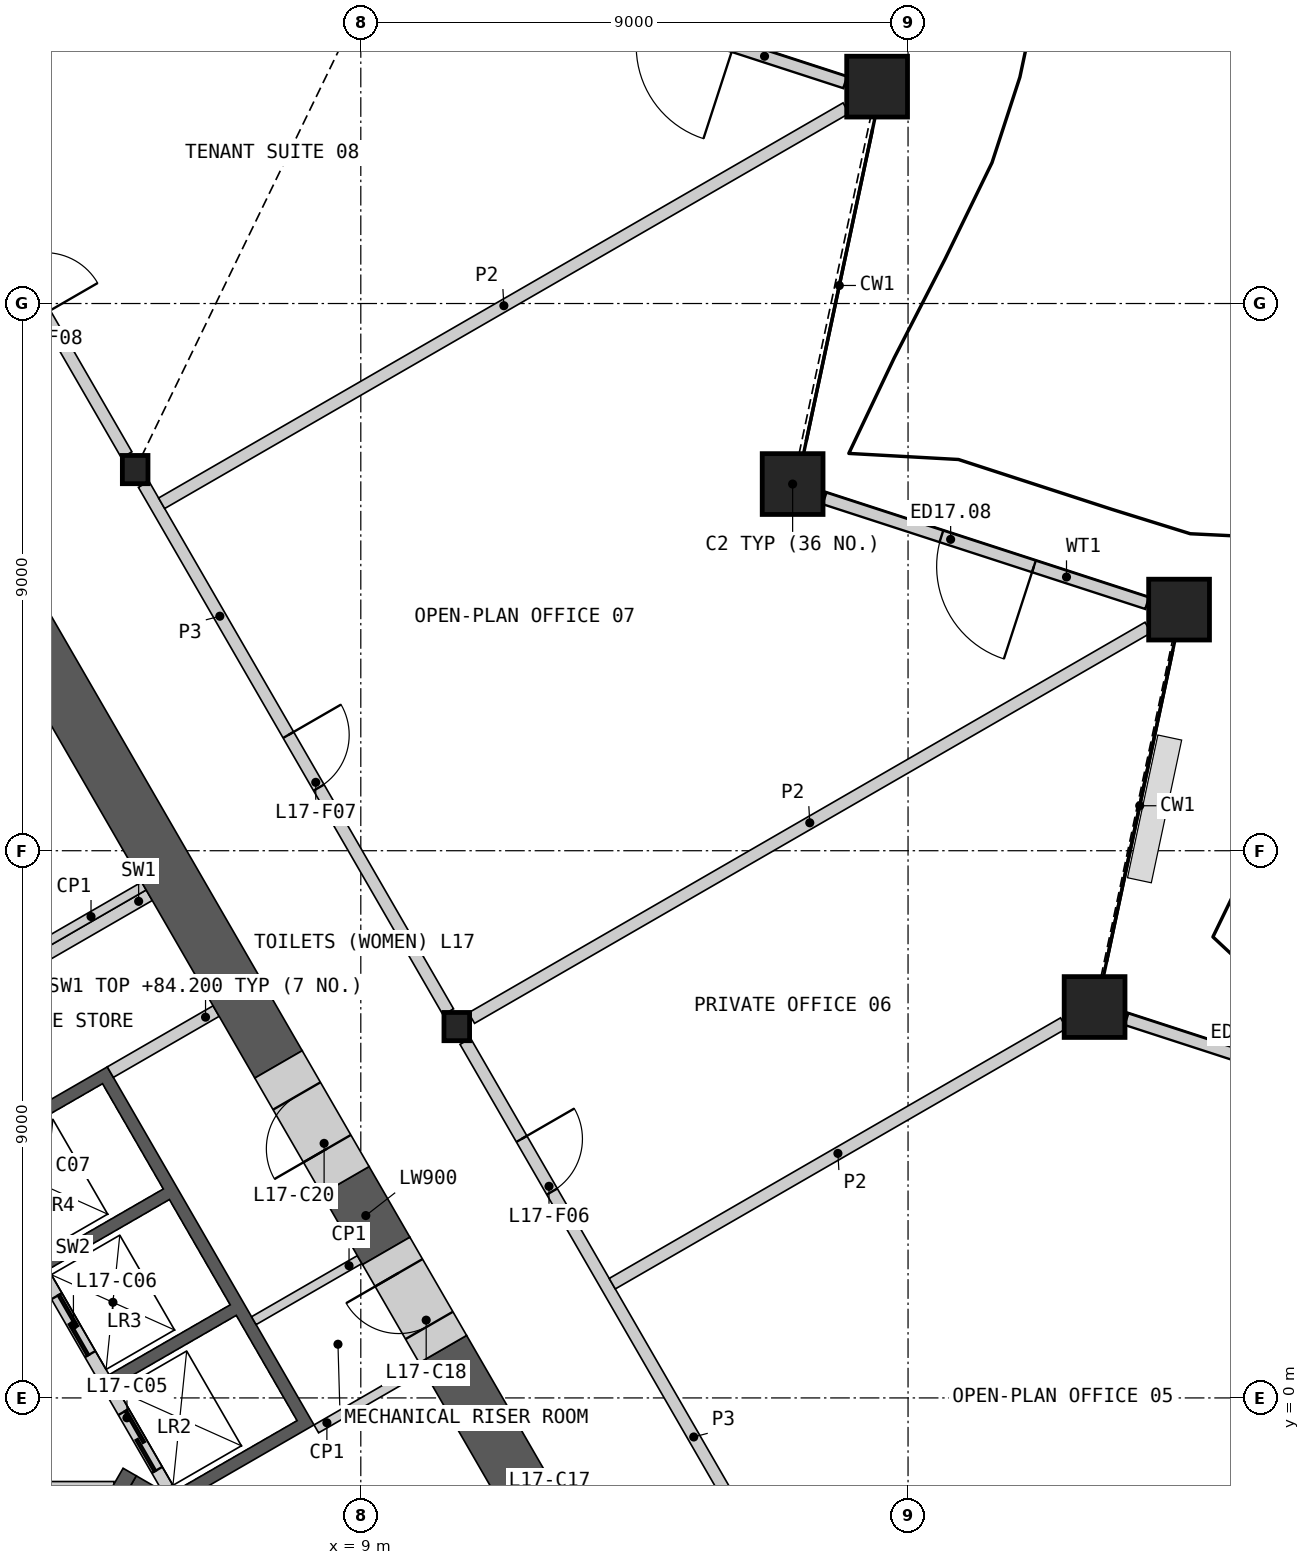
"""IFC4 building model, lengths in metres.
Left out: names, types, materials, properties, quantities, classifications, styles, units other than length and angle.
Written with IfcOpenShell. Run it as: python <this file> out.ifc"""

import sys

from ifc_helpers import new_model, si_unit, direction, frame, frame_2d, origin, origin_2d, place, context, subcontext, project, spatial, polyline, rectangle, hollow_rectangle, i_section, outline, extrude, element, fill, save


model = new_model("IFC4")
c1 = context("Model", 3, precision=1e-05, world=origin(), true_north=direction((0.0, 1.0)))
c2 = subcontext(c1, "Body", "Model", "MODEL_VIEW")
j1 = project(units=[si_unit("LENGTHUNIT", "METRE"), si_unit("PLANEANGLEUNIT", "RADIAN")], contexts=[c1])
p1 = place(None, origin())
s1 = spatial("IfcSite", under=j1, at=p1, CompositionType="ELEMENT")
p2 = place(p1, origin())
s2 = spatial("IfcBuilding", under=s1, at=p2, CompositionType="ELEMENT")
p3 = place(p2, frame((0.0, 0.0, 80.4)))
s3 = spatial("IfcBuildingStorey", under=s2, at=p3, CompositionType="ELEMENT", Elevation=80.4)
for number, where, z_axis, x_axis in (
    (1, (21.068, 6.429, 0.0), (0.0, 0.0, 1.0), (1.0, 0.0, 0.0)),
    (2, (22.457, 12.966, 0.0), (0.0, 0.0, 1.0), (1.0, 0.0, 0.0)),
    (3, (16.102, 15.031, 0.0), (0.0, 0.0, 1.0), (1.0, 0.0, 0.0)),
    (4, (17.491, 21.567, 0.0), (0.0, 0.0, 1.0), (1.0, 0.0, 0.0)),
):
    element("IfcColumn", number, at=place(p3, frame(where, z_axis=z_axis, x_axis=x_axis)), inside=s3, PredefinedType="COLUMN", context=c2, shape_type="SweptSolid", body=[
        extrude(hollow_rectangle(XDim=1.0, YDim=1.0, WallThickness=0.07, at=origin_2d()), origin(), (0.0, 0.0, 1.0), 4.2),
    ])
for number, where, z_axis, x_axis in (
    (5, (10.578, 6.107, 0.0), (0.0, 0.0, 1.0), (1.0, 0.0, 0.0)),
    (6, (5.289, 15.269, 0.0), (0.0, 0.0, 1.0), (1.0, 0.0, 0.0)),
):
    element("IfcColumn", number, at=place(p3, frame(where, z_axis=z_axis, x_axis=x_axis)), inside=s3, PredefinedType="COLUMN", context=c2, shape_type="SweptSolid", body=[
        extrude(i_section(OverallWidth=0.421, OverallDepth=0.465, WebThickness=0.045, FlangeThickness=0.072, at=origin_2d()), origin(), (0.0, 0.0, 1.0), 4.2),
    ])
p4 = place(p3, frame((26.899, 4.505, 0.0), z_axis=(0.0, 0.0, 1.0), x_axis=(-0.951054004345, 0.309024725255, 0.0)))
e7 = element("IfcWall", 7, at=p4, inside=s3, PredefinedType="SOLIDWALL", context=c2, shape_type="SweptSolid", body=[
    extrude(rectangle(XDim=5.579, YDim=0.2, at=frame_2d((2.79, 0.0))), origin(), (0.0, 0.0, 1.0), 3.189),
])
p5 = place(p4, frame((1.985, 0.0, 0.0)))
e8 = element("IfcOpeningElement", 8, at=p5, cuts=e7, PredefinedType="OPENING", context=c2, shape_type="SweptSolid", body=[
    extrude(rectangle(XDim=1.6, YDim=2.4, at=frame_2d((0.8, 1.2))), frame((0.0, 0.11, 0.0), z_axis=(0.0, -1.0, 0.0), x_axis=(1.0, 0.0, 0.0)), (0.0, 0.0, 1.0), 0.22),
])
p6 = place(p3, frame((21.933, 13.071, 0.0), z_axis=(0.0, 0.0, 1.0), x_axis=(-0.951054004345, 0.309024725255, 0.0)))
e9 = element("IfcWall", 9, at=p6, inside=s3, PredefinedType="SOLIDWALL", context=c2, shape_type="SweptSolid", body=[
    extrude(rectangle(XDim=5.579, YDim=0.2, at=frame_2d((2.79, 0.0))), origin(), (0.0, 0.0, 1.0), 3.189),
])
p7 = place(p6, frame((1.958, 0.0, 0.0)))
e10 = element("IfcOpeningElement", 10, at=p7, cuts=e9, PredefinedType="OPENING", context=c2, shape_type="SweptSolid", body=[
    extrude(rectangle(XDim=1.6, YDim=2.4, at=frame_2d((0.8, 1.2))), frame((0.0, 0.11, 0.0), z_axis=(0.0, -1.0, 0.0), x_axis=(1.0, 0.0, 0.0)), (0.0, 0.0, 1.0), 0.22),
])
p8 = place(p3, frame((16.967, 21.636, 0.0), z_axis=(0.0, 0.0, 1.0), x_axis=(-0.951054004345, 0.309024725255, 0.0)))
e11 = element("IfcWall", 11, at=p8, inside=s3, PredefinedType="SOLIDWALL", context=c2, shape_type="SweptSolid", body=[
    extrude(rectangle(XDim=5.579, YDim=0.2, at=frame_2d((2.79, 0.0))), origin(), (0.0, 0.0, 1.0), 3.189),
])
p9 = place(p8, frame((1.931, 0.0, 0.0)))
e12 = element("IfcOpeningElement", 12, at=p9, cuts=e11, PredefinedType="OPENING", context=c2, shape_type="SweptSolid", body=[
    extrude(rectangle(XDim=1.6, YDim=2.4, at=frame_2d((0.8, 1.2))), frame((0.0, 0.11, 0.0), z_axis=(0.0, -1.0, 0.0), x_axis=(1.0, 0.0, 0.0)), (0.0, 0.0, 1.0), 0.22),
])
p10 = place(p3, origin())
e13 = element("IfcWall", 13, at=p10, inside=s3, PredefinedType="SHEAR", context=c2, shape_type="SweptSolid", body=[
    extrude(outline(polyline([(2.66, 4.192), (4.831, 5.445), (8.231, -0.444), (6.061, -1.697), (5.96, -1.524), (7.952, -0.374), (6.952, 1.358), (4.96, 0.208), (4.861, 0.381), (6.852, 1.531), (5.852, 3.263), (3.861, 2.113), (3.76, 2.287), (5.752, 3.437), (4.752, 5.169), (2.76, 4.019), (2.66, 4.192)])), origin(), (0.0, 0.0, 1.0), 3.8),
])
p11 = place(p3, frame((5.817, -1.476, 0.0), z_axis=(0.0, 0.0, 1.0), x_axis=(-0.500002616675, 0.866023893041, 0.0)))
e14 = element("IfcWall", 14, at=p11, inside=s3, PredefinedType="SOLIDWALL", context=c2, shape_type="SweptSolid", body=[
    extrude(rectangle(XDim=8.373, YDim=0.2, at=frame_2d((4.187, 0.0))), origin(), (0.0, 0.0, 1.0), 3.8),
])
p12 = place(p11, frame((0.337, 0.0, 0.0)))
e15 = element("IfcOpeningElement", 15, at=p12, cuts=e14, PredefinedType="OPENING", context=c2, shape_type="SweptSolid", body=[
    extrude(rectangle(XDim=1.1, YDim=2.1, at=frame_2d((0.55, 1.05))), frame((0.0, 0.11, 0.0), z_axis=(0.0, -1.0, 0.0), x_axis=(1.0, 0.0, 0.0)), (0.0, 0.0, 1.0), 0.22),
])
p13 = place(p11, frame((2.537, 0.0, 0.0)))
e16 = element("IfcOpeningElement", 16, at=p13, cuts=e14, PredefinedType="OPENING", context=c2, shape_type="SweptSolid", body=[
    extrude(rectangle(XDim=1.1, YDim=2.1, at=frame_2d((0.55, 1.05))), frame((0.0, 0.11, 0.0), z_axis=(0.0, -1.0, 0.0), x_axis=(1.0, 0.0, 0.0)), (0.0, 0.0, 1.0), 0.22),
])
p14 = place(p11, frame((4.737, 0.0, 0.0)))
e17 = element("IfcOpeningElement", 17, at=p14, cuts=e14, PredefinedType="OPENING", context=c2, shape_type="SweptSolid", body=[
    extrude(rectangle(XDim=1.1, YDim=2.1, at=frame_2d((0.55, 1.05))), frame((0.0, 0.11, 0.0), z_axis=(0.0, -1.0, 0.0), x_axis=(1.0, 0.0, 0.0)), (0.0, 0.0, 1.0), 0.22),
])
p15 = place(p11, frame((7.037, 0.0, 0.0)))
e18 = element("IfcOpeningElement", 18, at=p15, cuts=e14, PredefinedType="OPENING", context=c2, shape_type="SweptSolid", body=[
    extrude(rectangle(XDim=0.9, YDim=2.1, at=frame_2d((0.45, 1.05))), frame((0.0, 0.11, 0.0), z_axis=(0.0, -1.0, 0.0), x_axis=(1.0, 0.0, 0.0)), (0.0, 0.0, 1.0), 0.22),
])
p16 = place(p3, frame((4.881, 5.358, 0.0), z_axis=(0.0, 0.0, 1.0), x_axis=(0.866035824272, 0.499981950752, 0.0)))
e19 = element("IfcWall", 19, at=p16, inside=s3, PredefinedType="SHEAR", context=c2, shape_type="SweptSolid", body=[
    extrude(rectangle(XDim=2.009, YDim=0.2, at=frame_2d((1.004, 0.0))), origin(), (0.0, 0.0, 1.0), 3.8),
])
p17 = place(p3, frame((3.781, 7.263, 0.0), z_axis=(0.0, 0.0, 1.0), x_axis=(0.865983199114, 0.50007309351, 0.0)))
e20 = element("IfcWall", 20, at=p17, inside=s3, PredefinedType="SHEAR", context=c2, shape_type="SweptSolid", body=[
    extrude(rectangle(XDim=2.009, YDim=0.2, at=frame_2d((1.004, 0.0))), origin(), (0.0, 0.0, 1.0), 3.8),
])
p18 = place(p3, frame((-4.941, -1.45, 0.0), z_axis=(0.0, 0.0, 1.0), x_axis=(1.0, 0.0, 0.0)))
e21 = element("IfcWall", 21, at=p18, inside=s3, PredefinedType="PARTITIONING", context=c2, shape_type="SweptSolid", body=[
    extrude(rectangle(XDim=9.882, YDim=0.15, at=frame_2d((4.941, 0.0))), origin(), (0.0, 0.0, 1.0), 3.8),
])
p19 = place(p18, frame((4.391, 0.0, 0.0)))
e22 = element("IfcOpeningElement", 22, at=p19, cuts=e21, PredefinedType="OPENING", context=c2, shape_type="SweptSolid", body=[
    extrude(rectangle(XDim=1.1, YDim=2.1, at=frame_2d((0.55, 1.05))), frame((0.0, 0.085, 0.0), z_axis=(0.0, -1.0, 0.0), x_axis=(1.0, 0.0, 0.0)), (0.0, 0.0, 1.0), 0.17),
])
p20 = place(p3, origin())
e23 = element("IfcWall", 23, at=p20, inside=s3, PredefinedType="SHEAR", context=c2, shape_type="SweptSolid", body=[
    extrude(outline(polyline([(10.032, -4.298), (10.374, -4.206), (5.307, -1.281), (5.182, -1.498), (10.032, -4.298)])), origin(), (0.0, 0.0, 1.0), 3.8),
])
p21 = place(p3, frame((3.655, -3.893, 0.0), z_axis=(0.0, 0.0, 1.0), x_axis=(0.499982516597, 0.866035497597, 0.0)))
e24 = element("IfcWall", 24, at=p21, inside=s3, PredefinedType="SHEAR", context=c2, shape_type="SweptSolid", body=[
    extrude(rectangle(XDim=3.088, YDim=0.25, at=frame_2d((1.544, 0.0))), origin(), (0.0, 0.0, 1.0), 3.8),
])
p22 = place(p21, frame((0.994, 0.0, 0.0)))
e25 = element("IfcOpeningElement", 25, at=p22, cuts=e24, PredefinedType="OPENING", context=c2, shape_type="SweptSolid", body=[
    extrude(rectangle(XDim=1.1, YDim=2.1, at=frame_2d((0.55, 1.05))), frame((0.0, 0.135, 0.0), z_axis=(0.0, -1.0, 0.0), x_axis=(1.0, 0.0, 0.0)), (0.0, 0.0, 1.0), 0.27),
])
for number, where, z_axis, x_axis in (
    (26, (3.693, 7.415, 0.0), (0.0, 0.0, 1.0), (0.866, 0.5, 0.0)),
    (27, (8.268, -0.509, 0.0), (0.0, 0.0, 1.0), (0.866, 0.5, 0.0)),
):
    element("IfcWall", number, at=place(p3, frame(where, z_axis=z_axis, x_axis=x_axis)), inside=s3, PredefinedType="PARTITIONING", context=c2, shape_type="SweptSolid", body=[
        extrude(rectangle(XDim=2.009, YDim=0.15, at=frame_2d((1.004, 0.0))), origin(), (0.0, 0.0, 1.0), 3.8),
    ])
p23 = place(p3, frame((8.981, 2.275, 0.0), z_axis=(0.0, 0.0, 1.0), x_axis=(-0.866013584312, -0.500020471368, 0.0)))
e28 = element("IfcWall", 28, at=p23, inside=s3, PredefinedType="PARTITIONING", context=c2, shape_type="SweptSolid", body=[
    extrude(rectangle(XDim=2.009, YDim=0.15, at=frame_2d((1.005, 0.0))), origin(), (0.0, 0.0, 1.0), 3.8),
])
p24 = place(p3, frame((7.646, 5.486, 0.0), z_axis=(0.0, 0.0, 1.0), x_axis=(-0.499982660725, 0.866035414388, 0.0)))
e29 = element("IfcWall", 29, at=p24, inside=s3, PredefinedType="SHEAR", context=c2, shape_type="SweptSolid", body=[
    extrude(rectangle(XDim=10.206, YDim=0.9, at=frame_2d((5.103, 0.0))), origin(), (0.0, 0.0, 1.0), 3.8),
])
p25 = place(p3, frame((11.755, -1.63, 0.0), z_axis=(0.0, 0.0, 1.0), x_axis=(-0.499943114462, 0.866058244174, 0.0)))
e30 = element("IfcWall", 30, at=p25, inside=s3, PredefinedType="SHEAR", context=c2, shape_type="SweptSolid", body=[
    extrude(rectangle(XDim=2.809, YDim=0.9, at=frame_2d((1.405, 0.0))), origin(), (0.0, 0.0, 1.0), 3.8),
])
p26 = place(p3, frame((9.418, 2.418, 0.0), z_axis=(0.0, 0.0, 1.0), x_axis=(-0.49995335277, 0.8660523339, 0.0)))
e31 = element("IfcWall", 31, at=p26, inside=s3, PredefinedType="SHEAR", context=c2, shape_type="SweptSolid", body=[
    extrude(rectangle(XDim=1.343, YDim=0.9, at=frame_2d((0.671, 0.0))), origin(), (0.0, 0.0, 1.0), 3.8),
])
p27 = place(p3, frame((12.855, -3.536, 0.0), z_axis=(0.0, 0.0, 1.0), x_axis=(-0.50002983664, 0.866008176907, 0.0)))
e32 = element("IfcWall", 32, at=p27, inside=s3, PredefinedType="SHEAR", context=c2, shape_type="SweptSolid", body=[
    extrude(rectangle(XDim=2.2, YDim=0.9, at=frame_2d((1.1, 0.0))), origin(), (0.0, 0.0, 1.0), 3.8),
])
p28 = place(p27, frame((0.6, 0.0, 0.0)))
e33 = element("IfcOpeningElement", 33, at=p28, cuts=e32, PredefinedType="OPENING", context=c2, shape_type="SweptSolid", body=[
    extrude(rectangle(XDim=1.0, YDim=2.1, at=frame_2d((0.5, 1.05))), frame((0.0, 0.46, 0.0), z_axis=(0.0, -1.0, 0.0), x_axis=(1.0, 0.0, 0.0)), (0.0, 0.0, 1.0), 0.92),
])
p29 = place(p3, frame((10.35, 0.803, 0.0), z_axis=(0.0, 0.0, 1.0), x_axis=(-0.500081290722, 0.865978465477, 0.0)))
e34 = element("IfcWall", 34, at=p29, inside=s3, PredefinedType="SHEAR", context=c2, shape_type="SweptSolid", body=[
    extrude(rectangle(XDim=1.865, YDim=0.9, at=frame_2d((0.933, 0.0))), origin(), (0.0, 0.0, 1.0), 3.8),
])
p30 = place(p29, frame((0.45, 0.0, 0.0)))
e35 = element("IfcOpeningElement", 35, at=p30, cuts=e34, PredefinedType="OPENING", context=c2, shape_type="SweptSolid", body=[
    extrude(rectangle(XDim=1.0, YDim=2.1, at=frame_2d((0.5, 1.05))), frame((0.0, 0.46, 0.0), z_axis=(0.0, -1.0, 0.0), x_axis=(1.0, 0.0, 0.0)), (0.0, 0.0, 1.0), 0.92),
])
p31 = place(p3, frame((8.747, 3.58, 0.0), z_axis=(0.0, 0.0, 1.0), x_axis=(-0.50002983664, 0.866008176907, 0.0)))
e36 = element("IfcWall", 36, at=p31, inside=s3, PredefinedType="SHEAR", context=c2, shape_type="SweptSolid", body=[
    extrude(rectangle(XDim=2.2, YDim=0.9, at=frame_2d((1.1, 0.0))), origin(), (0.0, 0.0, 1.0), 3.8),
])
p32 = place(p31, frame((0.6, 0.0, 0.0)))
e37 = element("IfcOpeningElement", 37, at=p32, cuts=e36, PredefinedType="OPENING", context=c2, shape_type="SweptSolid", body=[
    extrude(rectangle(XDim=1.0, YDim=2.1, at=frame_2d((0.5, 1.05))), frame((0.0, 0.46, 0.0), z_axis=(0.0, -1.0, 0.0), x_axis=(1.0, 0.0, 0.0)), (0.0, 0.0, 1.0), 0.92),
])
p33 = place(p3, frame((5.429, 15.026, 0.0), z_axis=(0.0, 0.0, 1.0), x_axis=(0.50001002959, -0.86601961312, 0.0)))
e38 = element("IfcWall", 38, at=p33, inside=s3, PredefinedType="PARTITIONING", context=c2, shape_type="SweptSolid", body=[
    extrude(rectangle(XDim=10.019, YDim=0.2, at=frame_2d((5.009, 0.0))), origin(), (0.0, 0.0, 1.0), 3.8),
])
p34 = place(p33, frame((4.76, 0.0, 0.0)))
e39 = element("IfcOpeningElement", 39, at=p34, cuts=e38, PredefinedType="OPENING", context=c2, shape_type="SweptSolid", body=[
    extrude(rectangle(XDim=1.0, YDim=2.1, at=frame_2d((0.5, 1.05))), frame((0.0, 0.11, 0.0), z_axis=(0.0, -1.0, 0.0), x_axis=(1.0, 0.0, 0.0)), (0.0, 0.0, 1.0), 0.22),
])
p35 = place(p3, frame((10.719, 5.865, 0.0), z_axis=(0.0, 0.0, 1.0), x_axis=(0.49999175339, -0.866030164915, 0.0)))
e40 = element("IfcWall", 40, at=p35, inside=s3, PredefinedType="PARTITIONING", context=c2, shape_type="SweptSolid", body=[
    extrude(rectangle(XDim=10.019, YDim=0.2, at=frame_2d((5.009, 0.0))), origin(), (0.0, 0.0, 1.0), 3.8),
])
p36 = place(p35, frame((1.854, 0.0, 0.0)))
e41 = element("IfcOpeningElement", 41, at=p36, cuts=e40, PredefinedType="OPENING", context=c2, shape_type="SweptSolid", body=[
    extrude(rectangle(XDim=1.0, YDim=2.1, at=frame_2d((0.5, 1.05))), frame((0.0, 0.11, 0.0), z_axis=(0.0, -1.0, 0.0), x_axis=(1.0, 0.0, 0.0)), (0.0, 0.0, 1.0), 0.22),
])
p37 = place(p3, frame((1.913, 21.116, 0.0), z_axis=(0.0, 0.0, 1.0), x_axis=(0.500001069878, -0.866024786089, 0.0)))
e42 = element("IfcWall", 42, at=p37, inside=s3, PredefinedType="PARTITIONING", context=c2, shape_type="SweptSolid", body=[
    extrude(rectangle(XDim=6.473, YDim=0.2, at=frame_2d((3.236, 0.0))), origin(), (0.0, 0.0, 1.0), 3.8),
])
p38 = place(p37, frame((2.787, 0.0, 0.0)))
e43 = element("IfcOpeningElement", 43, at=p38, cuts=e42, PredefinedType="OPENING", context=c2, shape_type="SweptSolid", body=[
    extrude(rectangle(XDim=1.0, YDim=2.1, at=frame_2d((0.5, 1.05))), frame((0.0, 0.11, 0.0), z_axis=(0.0, -1.0, 0.0), x_axis=(1.0, 0.0, 0.0)), (0.0, 0.0, 1.0), 0.22),
])
p39 = place(p3, frame((2.039, 21.095, 0.0), z_axis=(0.0, 0.0, 1.0), x_axis=(0.761767039776, 0.647851045465, 0.0)))
e44 = element("IfcWall", 44, at=p39, inside=s3, PredefinedType="PARTITIONING", context=c2, shape_type="SweptSolid", body=[
    extrude(rectangle(XDim=13.219, YDim=0.2, at=frame_2d((6.609, 0.0))), origin(), (0.0, 0.0, 1.0), 2.885),
])
p40 = place(p3, frame((5.725, 14.715, 0.0), z_axis=(0.0, 0.0, 1.0), x_axis=(0.866032633092, 0.499987478263, 0.0)))
e45 = element("IfcWall", 45, at=p40, inside=s3, PredefinedType="PARTITIONING", context=c2, shape_type="SweptSolid", body=[
    extrude(rectangle(XDim=12.998, YDim=0.2, at=frame_2d((6.499, 0.0))), origin(), (0.0, 0.0, 1.0), 2.885),
])
p41 = place(p3, frame((10.821, 6.247, 0.0), z_axis=(0.0, 0.0, 1.0), x_axis=(0.866026729935, 0.499997703033, 0.0)))
e46 = element("IfcWall", 46, at=p41, inside=s3, PredefinedType="PARTITIONING", context=c2, shape_type="SweptSolid", body=[
    extrude(rectangle(XDim=12.848, YDim=0.2, at=frame_2d((6.424, 0.0))), origin(), (0.0, 0.0, 1.0), 2.885),
])
p42 = place(p3, frame((13.135, 1.879, 0.0), z_axis=(0.0, 0.0, 1.0), x_axis=(0.866027626846, 0.499996149525, 0.0)))
e47 = element("IfcWall", 47, at=p42, inside=s3, PredefinedType="PARTITIONING", context=c2, shape_type="SweptSolid", body=[
    extrude(rectangle(XDim=8.571, YDim=0.2, at=frame_2d((4.285, 0.0))), origin(), (0.0, 0.0, 1.0), 2.885),
])
p43 = place(p7, origin())
e48 = element("IfcDoor", 48, at=p43, inside=s3, OperationType="DOUBLE_DOOR_SINGLE_SWING", PredefinedType="DOOR", context=c2, shape_type="SweptSolid", body=[
    extrude(rectangle(XDim=1.6, YDim=2.4, at=frame_2d((0.8, 1.2))), frame((0.0, 0.025, 0.0), z_axis=(0.0, -1.0, 0.0), x_axis=(1.0, 0.0, 0.0)), (0.0, 0.0, 1.0), 0.05),
])
fill(e10, e48)
p44 = place(p12, origin())
e49 = element("IfcDoor", 49, at=p44, inside=s3, OperationType="SLIDING_TO_LEFT", PredefinedType="DOOR", context=c2, shape_type="SweptSolid", body=[
    extrude(rectangle(XDim=1.1, YDim=2.1, at=frame_2d((0.55, 1.05))), frame((0.0, 0.025, 0.0), z_axis=(0.0, -1.0, 0.0), x_axis=(1.0, 0.0, 0.0)), (0.0, 0.0, 1.0), 0.05),
])
fill(e15, e49)
p45 = place(p13, origin())
e50 = element("IfcDoor", 50, at=p45, inside=s3, OperationType="SLIDING_TO_LEFT", PredefinedType="DOOR", context=c2, shape_type="SweptSolid", body=[
    extrude(rectangle(XDim=1.1, YDim=2.1, at=frame_2d((0.55, 1.05))), frame((0.0, 0.025, 0.0), z_axis=(0.0, -1.0, 0.0), x_axis=(1.0, 0.0, 0.0)), (0.0, 0.0, 1.0), 0.05),
])
fill(e16, e50)
p46 = place(p30, origin())
e51 = element("IfcDoor", 51, at=p46, inside=s3, OperationType="SINGLE_SWING_RIGHT", PredefinedType="DOOR", context=c2, shape_type="SweptSolid", body=[
    extrude(rectangle(XDim=1.0, YDim=2.1, at=frame_2d((0.5, 1.05))), frame((0.0, 0.205, 0.0), z_axis=(0.0, -1.0, 0.0), x_axis=(1.0, 0.0, 0.0)), (0.0, 0.0, 1.0), 0.05),
])
fill(e35, e51)
p47 = place(p32, origin())
e52 = element("IfcDoor", 52, at=p47, inside=s3, OperationType="SINGLE_SWING_LEFT", PredefinedType="DOOR", context=c2, shape_type="SweptSolid", body=[
    extrude(rectangle(XDim=1.0, YDim=2.1, at=frame_2d((0.5, 1.05))), frame((0.0, 0.205, 0.0), z_axis=(0.0, -1.0, 0.0), x_axis=(1.0, 0.0, 0.0)), (0.0, 0.0, 1.0), 0.05),
])
fill(e37, e52)
p48 = place(p36, origin())
e53 = element("IfcDoor", 53, at=p48, inside=s3, OperationType="SINGLE_SWING_LEFT", PredefinedType="DOOR", context=c2, shape_type="SweptSolid", body=[
    extrude(rectangle(XDim=1.0, YDim=2.1, at=frame_2d((0.5, 1.05))), frame((0.0, 0.025, 0.0), z_axis=(0.0, -1.0, 0.0), x_axis=(1.0, 0.0, 0.0)), (0.0, 0.0, 1.0), 0.05),
])
fill(e41, e53)
p49 = place(p34, origin())
e54 = element("IfcDoor", 54, at=p49, inside=s3, OperationType="SINGLE_SWING_LEFT", PredefinedType="DOOR", context=c2, shape_type="SweptSolid", body=[
    extrude(rectangle(XDim=1.0, YDim=2.1, at=frame_2d((0.5, 1.05))), frame((0.0, 0.025, 0.0), z_axis=(0.0, -1.0, 0.0), x_axis=(1.0, 0.0, 0.0)), (0.0, 0.0, 1.0), 0.05),
])
fill(e39, e54)
save(model, sys.argv[1])
